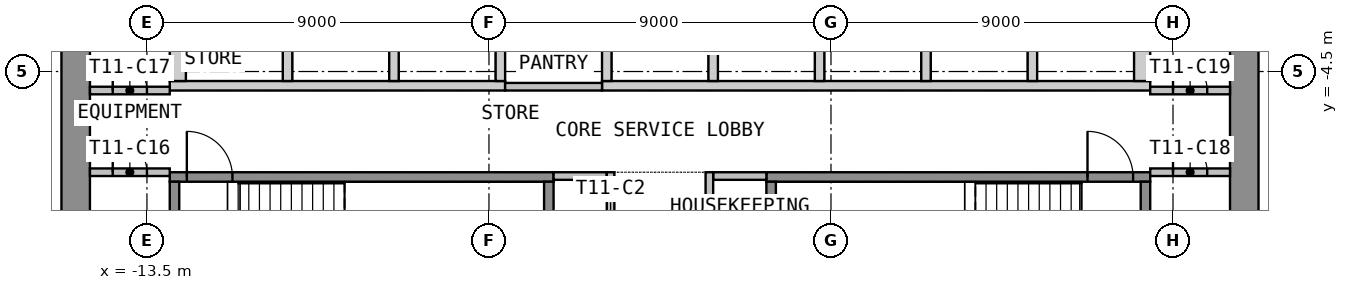
"""IFC4 building model, lengths in metres.
Left out: names, types, materials, properties, quantities, classifications, styles, units other than length and angle.
Written with IfcOpenShell. Run it as: python <this file> out.ifc"""

import sys

from ifc_helpers import new_model, si_unit, direction, frame, frame_2d, origin, place, context, subcontext, project, spatial, polyline, rectangle, outline, extrude, element, fill, save


model = new_model("IFC4")
c1 = context("Model", 3, precision=1e-05, world=origin(), true_north=direction((0.0, 1.0)))
c2 = subcontext(c1, "Body", "Model", "MODEL_VIEW")
j1 = project(units=[si_unit("LENGTHUNIT", "METRE"), si_unit("PLANEANGLEUNIT", "RADIAN")], contexts=[c1])
p1 = place(None, origin())
s1 = spatial("IfcSite", under=j1, at=p1, CompositionType="ELEMENT")
p2 = place(p1, origin())
s2 = spatial("IfcBuilding", under=s1, at=p2, CompositionType="ELEMENT")
p3 = place(p2, frame((0.0, 0.0, 156.0)))
s3 = spatial("IfcBuildingStorey", under=s2, at=p3, CompositionType="ELEMENT", Elevation=156.0)
p4 = place(p3, frame((-15.375, -12.75, 0.0), z_axis=(0.0, 0.0, 1.0), x_axis=(0.0, 1.0, 0.0)))
e1 = element("IfcWall", 1, at=p4, inside=s3, PredefinedType="SHEAR", context=c2, shape_type="SweptSolid", body=[
    extrude(rectangle(XDim=25.5, YDim=0.75, at=frame_2d((12.75, 0.0))), origin(), (0.0, 0.0, 1.0), 3.575),
])
p5 = place(p4, frame((11.55, 0.0, 0.0)))
e2 = element("IfcOpeningElement", 2, at=p5, cuts=e1, PredefinedType="OPENING", context=c2, shape_type="SweptSolid", body=[
    extrude(rectangle(XDim=2.4, YDim=2.1, at=frame_2d((1.2, 1.05))), frame((0.0, 0.385, 0.0), z_axis=(0.0, -1.0, 0.0), x_axis=(1.0, 0.0, 0.0)), (0.0, 0.0, 1.0), 0.77),
])
p6 = place(p3, frame((15.375, -12.75, 0.0), z_axis=(0.0, 0.0, 1.0), x_axis=(0.0, 1.0, 0.0)))
e3 = element("IfcWall", 3, at=p6, inside=s3, PredefinedType="SHEAR", context=c2, shape_type="SweptSolid", body=[
    extrude(rectangle(XDim=25.5, YDim=0.75, at=frame_2d((12.75, 0.0))), origin(), (0.0, 0.0, 1.0), 3.575),
])
p7 = place(p6, frame((11.55, 0.0, 0.0)))
e4 = element("IfcOpeningElement", 4, at=p7, cuts=e3, PredefinedType="OPENING", context=c2, shape_type="SweptSolid", body=[
    extrude(rectangle(XDim=2.4, YDim=2.1, at=frame_2d((1.2, 1.05))), frame((0.0, 0.385, 0.0), z_axis=(0.0, -1.0, 0.0), x_axis=(1.0, 0.0, 0.0)), (0.0, 0.0, 1.0), 0.77),
])
p8 = place(p3, origin())
e5 = element("IfcWall", 5, at=p8, inside=s3, PredefinedType="SHEAR", context=c2, shape_type="SweptSolid", body=[
    extrude(outline(polyline([(-12.9, -5.0), (-4.075, -5.0), (-4.075, -4.75), (-12.9, -4.75), (-12.9, -5.0)])), origin(), (0.0, 0.0, 1.0), 3.575),
])
p9 = place(p3, origin())
e6 = element("IfcWall", 6, at=p9, inside=s3, PredefinedType="SHEAR", context=c2, shape_type="SweptSolid", body=[
    extrude(outline(polyline([(-1.525, -5.0), (12.9, -5.0), (12.9, -4.75), (-1.525, -4.75), (-1.525, -5.0)])), origin(), (0.0, 0.0, 1.0), 3.575),
])
p10 = place(p3, origin())
e7 = element("IfcWall", 7, at=p10, inside=s3, PredefinedType="SHEAR", context=c2, shape_type="SweptSolid", body=[
    extrude(outline(polyline([(-12.9, -4.75), (-12.475, -4.75), (-12.475, -3.05), (-12.9, -3.05), (-12.9, -4.75)])), origin(), (0.0, 0.0, 1.0), 3.575),
])
p11 = place(p3, origin())
e8 = element("IfcWall", 8, at=p11, inside=s3, PredefinedType="SHEAR", context=c2, shape_type="SweptSolid", body=[
    extrude(outline(polyline([(-9.925, -4.75), (-9.675, -4.75), (-9.675, -3.05), (-9.925, -3.05), (-9.925, -4.75)])), origin(), (0.0, 0.0, 1.0), 3.575),
])
p12 = place(p3, origin())
e9 = element("IfcWall", 9, at=p12, inside=s3, PredefinedType="SHEAR", context=c2, shape_type="SweptSolid", body=[
    extrude(outline(polyline([(-7.125, -4.75), (-6.875, -4.75), (-6.875, -3.05), (-7.125, -3.05), (-7.125, -4.75)])), origin(), (0.0, 0.0, 1.0), 3.575),
])
p13 = place(p3, origin())
e10 = element("IfcWall", 10, at=p13, inside=s3, PredefinedType="SHEAR", context=c2, shape_type="SweptSolid", body=[
    extrude(outline(polyline([(-4.325, -4.75), (-4.075, -4.75), (-4.075, -3.05), (-4.325, -3.05), (-4.325, -4.75)])), origin(), (0.0, 0.0, 1.0), 3.575),
])
p14 = place(p3, origin())
e11 = element("IfcWall", 11, at=p14, inside=s3, PredefinedType="SHEAR", context=c2, shape_type="SweptSolid", body=[
    extrude(outline(polyline([(-1.525, -4.75), (-1.275, -4.75), (-1.275, -2.05), (-1.525, -2.05), (-1.525, -4.75)])), origin(), (0.0, 0.0, 1.0), 3.575),
])
p15 = place(p3, origin())
e12 = element("IfcWall", 12, at=p15, inside=s3, PredefinedType="SHEAR", context=c2, shape_type="SweptSolid", body=[
    extrude(outline(polyline([(1.275, -4.75), (1.525, -4.75), (1.525, -2.05), (1.275, -2.05), (1.275, -4.75)])), origin(), (0.0, 0.0, 1.0), 3.575),
])
p16 = place(p3, origin())
e13 = element("IfcWall", 13, at=p16, inside=s3, PredefinedType="SHEAR", context=c2, shape_type="SweptSolid", body=[
    extrude(outline(polyline([(4.075, -4.75), (4.325, -4.75), (4.325, -2.05), (4.075, -2.05), (4.075, -4.75)])), origin(), (0.0, 0.0, 1.0), 3.575),
])
p17 = place(p3, origin())
e14 = element("IfcWall", 14, at=p17, inside=s3, PredefinedType="SHEAR", context=c2, shape_type="SweptSolid", body=[
    extrude(outline(polyline([(6.875, -4.75), (7.125, -4.75), (7.125, -2.05), (6.875, -2.05), (6.875, -4.75)])), origin(), (0.0, 0.0, 1.0), 3.575),
])
p18 = place(p3, origin())
e15 = element("IfcWall", 15, at=p18, inside=s3, PredefinedType="SHEAR", context=c2, shape_type="SweptSolid", body=[
    extrude(outline(polyline([(9.675, -4.75), (9.925, -4.75), (9.925, -2.05), (9.675, -2.05), (9.675, -4.75)])), origin(), (0.0, 0.0, 1.0), 3.575),
])
p19 = place(p3, origin())
e16 = element("IfcWall", 16, at=p19, inside=s3, PredefinedType="SHEAR", context=c2, shape_type="SweptSolid", body=[
    extrude(outline(polyline([(12.475, -4.75), (12.9, -4.75), (12.9, -2.05), (12.475, -2.05), (12.475, -4.75)])), origin(), (0.0, 0.0, 1.0), 3.575),
])
p20 = place(p3, frame((-12.9, -7.275, 0.0), z_axis=(0.0, 0.0, 1.0), x_axis=(1.0, 0.0, 0.0)))
e17 = element("IfcWall", 17, at=p20, inside=s3, PredefinedType="SHEAR", context=c2, shape_type="SweptSolid", body=[
    extrude(rectangle(XDim=10.1, YDim=0.25, at=frame_2d((5.05, 0.0))), origin(), (0.0, 0.0, 1.0), 3.575),
])
p21 = place(p20, frame((0.45, 0.0, 0.0)))
e18 = element("IfcOpeningElement", 18, at=p21, cuts=e17, PredefinedType="OPENING", context=c2, shape_type="SweptSolid", body=[
    extrude(rectangle(XDim=1.2, YDim=2.1, at=frame_2d((0.6, 1.05))), frame((0.0, 0.135, 0.0), z_axis=(0.0, -1.0, 0.0), x_axis=(1.0, 0.0, 0.0)), (0.0, 0.0, 1.0), 0.27),
])
for number, where, z_axis, x_axis in (
    (19, (-12.775, -10.65, 0.0), (0.0, 0.0, 1.0), (0.0, 1.0, 0.0)),
    (20, (-2.925, -10.65, 0.0), (0.0, 0.0, 1.0), (0.0, 1.0, 0.0)),
):
    element("IfcWall", number, at=place(p3, frame(where, z_axis=z_axis, x_axis=x_axis)), inside=s3, PredefinedType="SHEAR", context=c2, shape_type="SweptSolid", body=[
        extrude(rectangle(XDim=3.25, YDim=0.25, at=frame_2d((1.625, 0.0))), origin(), (0.0, 0.0, 1.0), 3.575),
    ])
p22 = place(p3, frame((2.8, -7.275, 0.0), z_axis=(0.0, 0.0, 1.0), x_axis=(1.0, 0.0, 0.0)))
e21 = element("IfcWall", 21, at=p22, inside=s3, PredefinedType="SHEAR", context=c2, shape_type="SweptSolid", body=[
    extrude(rectangle(XDim=10.1, YDim=0.25, at=frame_2d((5.05, 0.0))), origin(), (0.0, 0.0, 1.0), 3.575),
])
p23 = place(p22, frame((8.45, 0.0, 0.0)))
e22 = element("IfcOpeningElement", 22, at=p23, cuts=e21, PredefinedType="OPENING", context=c2, shape_type="SweptSolid", body=[
    extrude(rectangle(XDim=1.2, YDim=2.1, at=frame_2d((0.6, 1.05))), frame((0.0, 0.135, 0.0), z_axis=(0.0, -1.0, 0.0), x_axis=(1.0, 0.0, 0.0)), (0.0, 0.0, 1.0), 0.27),
])
for number, where, z_axis, x_axis in (
    (23, (2.925, -10.65, 0.0), (0.0, 0.0, 1.0), (0.0, 1.0, 0.0)),
    (24, (12.775, -10.65, 0.0), (0.0, 0.0, 1.0), (0.0, 1.0, 0.0)),
):
    element("IfcWall", number, at=place(p3, frame(where, z_axis=z_axis, x_axis=x_axis)), inside=s3, PredefinedType="SHEAR", context=c2, shape_type="SweptSolid", body=[
        extrude(rectangle(XDim=3.25, YDim=0.25, at=frame_2d((1.625, 0.0))), origin(), (0.0, 0.0, 1.0), 3.575),
    ])
for number, where, z_axis, x_axis in (
    (25, (-2.8, -7.25, 0.0), (0.0, 0.0, 1.0), (1.0, 0.0, 0.0)),
    (26, (1.4, -7.25, 0.0), (0.0, 0.0, 1.0), (1.0, 0.0, 0.0)),
):
    element("IfcWall", number, at=place(p3, frame(where, z_axis=z_axis, x_axis=x_axis)), inside=s3, PredefinedType="PARTITIONING", context=c2, shape_type="SweptSolid", body=[
        extrude(rectangle(XDim=1.4, YDim=0.2, at=frame_2d((0.7, 0.0))), origin(), (0.0, 0.0, 1.0), 3.575),
    ])
p24 = place(p3, frame((-1.3, -12.75, 0.0), z_axis=(0.0, 0.0, 1.0), x_axis=(0.0, 1.0, 0.0)))
e27 = element("IfcWall", 27, at=p24, inside=s3, PredefinedType="PARTITIONING", context=c2, shape_type="SweptSolid", body=[
    extrude(rectangle(XDim=5.6, YDim=0.2, at=frame_2d((2.8, 0.0))), origin(), (0.0, 0.0, 1.0), 3.575),
])
p25 = place(p24, frame((0.9, 0.0, 0.0)))
e28 = element("IfcOpeningElement", 28, at=p25, cuts=e27, PredefinedType="OPENING", context=c2, shape_type="SweptSolid", body=[
    extrude(rectangle(XDim=0.9, YDim=2.1, at=frame_2d((0.45, 1.05))), frame((0.0, 0.11, 0.0), z_axis=(0.0, -1.0, 0.0), x_axis=(1.0, 0.0, 0.0)), (0.0, 0.0, 1.0), 0.22),
])
p26 = place(p24, frame((3.6, 0.0, 0.0)))
e29 = element("IfcOpeningElement", 29, at=p26, cuts=e27, PredefinedType="OPENING", context=c2, shape_type="SweptSolid", body=[
    extrude(rectangle(XDim=0.9, YDim=2.1, at=frame_2d((0.45, 1.05))), frame((0.0, 0.11, 0.0), z_axis=(0.0, -1.0, 0.0), x_axis=(1.0, 0.0, 0.0)), (0.0, 0.0, 1.0), 0.22),
])
p27 = place(p3, frame((1.3, -12.75, 0.0), z_axis=(0.0, 0.0, 1.0), x_axis=(0.0, 1.0, 0.0)))
e30 = element("IfcWall", 30, at=p27, inside=s3, PredefinedType="PARTITIONING", context=c2, shape_type="SweptSolid", body=[
    extrude(rectangle(XDim=5.6, YDim=0.2, at=frame_2d((2.8, 0.0))), origin(), (0.0, 0.0, 1.0), 3.575),
])
p28 = place(p27, frame((2.25, 0.0, 0.0)))
e31 = element("IfcOpeningElement", 31, at=p28, cuts=e30, PredefinedType="OPENING", context=c2, shape_type="SweptSolid", body=[
    extrude(rectangle(XDim=0.9, YDim=2.1, at=frame_2d((0.45, 1.05))), frame((0.0, 0.11, 0.0), z_axis=(0.0, -1.0, 0.0), x_axis=(1.0, 0.0, 0.0)), (0.0, 0.0, 1.0), 0.22),
])
p29 = place(p3, frame((-15.0, -7.15, 0.0), z_axis=(0.0, 0.0, 1.0), x_axis=(1.0, 0.0, 0.0)))
e32 = element("IfcWall", 32, at=p29, inside=s3, PredefinedType="PARTITIONING", context=c2, shape_type="SweptSolid", body=[
    extrude(rectangle(XDim=2.1, YDim=0.2, at=frame_2d((1.05, 0.0))), origin(), (0.0, 0.0, 1.0), 3.575),
])
p30 = place(p29, frame((0.6, 0.0, 0.0)))
e33 = element("IfcOpeningElement", 33, at=p30, cuts=e32, PredefinedType="OPENING", context=c2, shape_type="SweptSolid", body=[
    extrude(rectangle(XDim=0.9, YDim=2.1, at=frame_2d((0.45, 1.05))), frame((0.0, 0.11, 0.0), z_axis=(0.0, -1.0, 0.0), x_axis=(1.0, 0.0, 0.0)), (0.0, 0.0, 1.0), 0.22),
])
p31 = place(p3, frame((-15.0, -5.0, 0.0), z_axis=(0.0, 0.0, 1.0), x_axis=(1.0, 0.0, 0.0)))
e34 = element("IfcWall", 34, at=p31, inside=s3, PredefinedType="PARTITIONING", context=c2, shape_type="SweptSolid", body=[
    extrude(rectangle(XDim=2.1, YDim=0.2, at=frame_2d((1.05, 0.0))), origin(), (0.0, 0.0, 1.0), 3.575),
])
p32 = place(p31, frame((0.6, 0.0, 0.0)))
e35 = element("IfcOpeningElement", 35, at=p32, cuts=e34, PredefinedType="OPENING", context=c2, shape_type="SweptSolid", body=[
    extrude(rectangle(XDim=0.9, YDim=2.1, at=frame_2d((0.45, 1.05))), frame((0.0, 0.11, 0.0), z_axis=(0.0, -1.0, 0.0), x_axis=(1.0, 0.0, 0.0)), (0.0, 0.0, 1.0), 0.22),
])
p33 = place(p3, frame((12.9, -7.15, 0.0), z_axis=(0.0, 0.0, 1.0), x_axis=(1.0, 0.0, 0.0)))
e36 = element("IfcWall", 36, at=p33, inside=s3, PredefinedType="PARTITIONING", context=c2, shape_type="SweptSolid", body=[
    extrude(rectangle(XDim=2.1, YDim=0.2, at=frame_2d((1.05, 0.0))), origin(), (0.0, 0.0, 1.0), 3.575),
])
p34 = place(p33, frame((0.6, 0.0, 0.0)))
e37 = element("IfcOpeningElement", 37, at=p34, cuts=e36, PredefinedType="OPENING", context=c2, shape_type="SweptSolid", body=[
    extrude(rectangle(XDim=0.9, YDim=2.1, at=frame_2d((0.45, 1.05))), frame((0.0, 0.11, 0.0), z_axis=(0.0, -1.0, 0.0), x_axis=(1.0, 0.0, 0.0)), (0.0, 0.0, 1.0), 0.22),
])
p35 = place(p3, frame((12.9, -5.0, 0.0), z_axis=(0.0, 0.0, 1.0), x_axis=(1.0, 0.0, 0.0)))
e38 = element("IfcWall", 38, at=p35, inside=s3, PredefinedType="PARTITIONING", context=c2, shape_type="SweptSolid", body=[
    extrude(rectangle(XDim=2.1, YDim=0.2, at=frame_2d((1.05, 0.0))), origin(), (0.0, 0.0, 1.0), 3.575),
])
p36 = place(p35, frame((0.6, 0.0, 0.0)))
e39 = element("IfcOpeningElement", 39, at=p36, cuts=e38, PredefinedType="OPENING", context=c2, shape_type="SweptSolid", body=[
    extrude(rectangle(XDim=0.9, YDim=2.1, at=frame_2d((0.45, 1.05))), frame((0.0, 0.11, 0.0), z_axis=(0.0, -1.0, 0.0), x_axis=(1.0, 0.0, 0.0)), (0.0, 0.0, 1.0), 0.22),
])
p37 = place(p3, frame((-4.075, -4.9, 0.0), z_axis=(0.0, 0.0, 1.0), x_axis=(1.0, 0.0, 0.0)))
e40 = element("IfcWall", 40, at=p37, inside=s3, PredefinedType="PARTITIONING", context=c2, shape_type="SweptSolid", body=[
    extrude(rectangle(XDim=2.55, YDim=0.2, at=frame_2d((1.275, 0.0))), origin(), (0.0, 0.0, 1.0), 3.575),
])
p38 = place(p21, origin())
e41 = element("IfcDoor", 41, at=p38, inside=s3, OperationType="SINGLE_SWING_LEFT", PredefinedType="DOOR", context=c2, shape_type="SweptSolid", body=[
    extrude(rectangle(XDim=1.2, YDim=2.1, at=frame_2d((0.6, 1.05))), frame((0.0, 0.025, 0.0), z_axis=(0.0, -1.0, 0.0), x_axis=(1.0, 0.0, 0.0)), (0.0, 0.0, 1.0), 0.05),
])
fill(e18, e41)
p39 = place(p23, origin())
e42 = element("IfcDoor", 42, at=p39, inside=s3, OperationType="SINGLE_SWING_LEFT", PredefinedType="DOOR", context=c2, shape_type="SweptSolid", body=[
    extrude(rectangle(XDim=1.2, YDim=2.1, at=frame_2d((0.6, 1.05))), frame((0.0, 0.025, 0.0), z_axis=(0.0, -1.0, 0.0), x_axis=(1.0, 0.0, 0.0)), (0.0, 0.0, 1.0), 0.05),
])
fill(e22, e42)
p40 = place(p30, origin())
e43 = element("IfcDoor", 43, at=p40, inside=s3, OperationType="SINGLE_SWING_LEFT", PredefinedType="DOOR", context=c2, shape_type="SweptSolid", body=[
    extrude(rectangle(XDim=0.9, YDim=2.1, at=frame_2d((0.45, 1.05))), frame((0.0, 0.025, 0.0), z_axis=(0.0, -1.0, 0.0), x_axis=(1.0, 0.0, 0.0)), (0.0, 0.0, 1.0), 0.05),
])
fill(e33, e43)
p41 = place(p32, origin())
e44 = element("IfcDoor", 44, at=p41, inside=s3, OperationType="SINGLE_SWING_LEFT", PredefinedType="DOOR", context=c2, shape_type="SweptSolid", body=[
    extrude(rectangle(XDim=0.9, YDim=2.1, at=frame_2d((0.45, 1.05))), frame((0.0, 0.025, 0.0), z_axis=(0.0, -1.0, 0.0), x_axis=(1.0, 0.0, 0.0)), (0.0, 0.0, 1.0), 0.05),
])
fill(e35, e44)
p42 = place(p34, origin())
e45 = element("IfcDoor", 45, at=p42, inside=s3, OperationType="SINGLE_SWING_LEFT", PredefinedType="DOOR", context=c2, shape_type="SweptSolid", body=[
    extrude(rectangle(XDim=0.9, YDim=2.1, at=frame_2d((0.45, 1.05))), frame((0.0, 0.025, 0.0), z_axis=(0.0, -1.0, 0.0), x_axis=(1.0, 0.0, 0.0)), (0.0, 0.0, 1.0), 0.05),
])
fill(e37, e45)
p43 = place(p36, origin())
e46 = element("IfcDoor", 46, at=p43, inside=s3, OperationType="SINGLE_SWING_LEFT", PredefinedType="DOOR", context=c2, shape_type="SweptSolid", body=[
    extrude(rectangle(XDim=0.9, YDim=2.1, at=frame_2d((0.45, 1.05))), frame((0.0, 0.025, 0.0), z_axis=(0.0, -1.0, 0.0), x_axis=(1.0, 0.0, 0.0)), (0.0, 0.0, 1.0), 0.05),
])
fill(e39, e46)
save(model, sys.argv[1])
